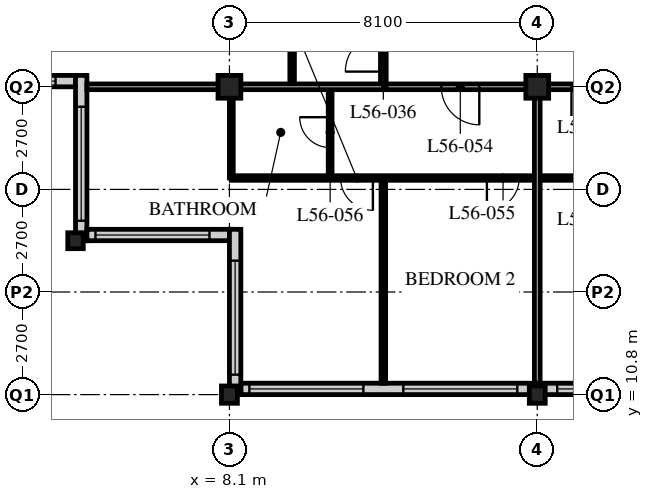
"""IFC4 building model, lengths in metres.
Left out: names, types, materials, properties, quantities, classifications, styles, units other than length and angle.
Written with IfcOpenShell. Run it as: python <this file> out.ifc"""

import sys

from ifc_helpers import new_model, si_unit, direction, frame, frame_2d, origin, origin_2d, place, context, subcontext, project, spatial, rectangle, hollow_rectangle, i_section, extrude, element, fill, save


model = new_model("IFC4")
c1 = context("Model", 3, precision=1e-05, world=origin(), true_north=direction((0.0, 1.0)))
c2 = subcontext(c1, "Body", "Model", "MODEL_VIEW")
j1 = project(units=[si_unit("LENGTHUNIT", "METRE"), si_unit("PLANEANGLEUNIT", "RADIAN")], contexts=[c1])
p1 = place(None, origin())
s1 = spatial("IfcSite", under=j1, at=p1, CompositionType="ELEMENT")
p2 = place(p1, origin())
s2 = spatial("IfcBuilding", under=s1, at=p2, CompositionType="ELEMENT")
p3 = place(p2, frame((0.0, 0.0, 217.2)))
s3 = spatial("IfcBuildingStorey", under=s2, at=p3, CompositionType="ELEMENT", Elevation=217.2)
p4 = place(p3, frame((4.05, 14.85, 0.0), z_axis=(0.0, 0.0, 1.0), x_axis=(1.0, 0.0, 0.0)))
e1 = element("IfcColumn", 1, at=p4, inside=s3, PredefinedType="COLUMN", context=c2, shape_type="SweptSolid", body=[
    extrude(i_section(OverallWidth=0.407, OverallDepth=0.419, WebThickness=0.031, FlangeThickness=0.049, FilletRadius=0.015, at=origin_2d()), origin(), (0.0, 0.0, 1.0), 3.6),
])
p5 = place(p3, frame((8.1, 10.8, 0.0), z_axis=(0.0, 0.0, 1.0), x_axis=(1.0, 0.0, 0.0)))
e2 = element("IfcColumn", 2, at=p5, inside=s3, PredefinedType="COLUMN", context=c2, shape_type="SweptSolid", body=[
    extrude(i_section(OverallWidth=0.418, OverallDepth=0.456, WebThickness=0.042, FlangeThickness=0.067, FilletRadius=0.015, at=origin_2d()), origin(), (0.0, 0.0, 1.0), 3.6),
])
p6 = place(p3, frame((8.1, 18.9, 0.0), z_axis=(0.0, 0.0, 1.0), x_axis=(1.0, 0.0, 0.0)))
e3 = element("IfcColumn", 3, at=p6, inside=s3, PredefinedType="COLUMN", context=c2, shape_type="SweptSolid", body=[
    extrude(hollow_rectangle(XDim=0.6, YDim=0.6, WallThickness=0.05, at=origin_2d()), origin(), (0.0, 0.0, 1.0), 3.6),
])
p7 = place(p3, frame((16.2, 10.8, 0.0), z_axis=(0.0, 0.0, 1.0), x_axis=(1.0, 0.0, 0.0)))
e4 = element("IfcColumn", 4, at=p7, inside=s3, PredefinedType="COLUMN", context=c2, shape_type="SweptSolid", body=[
    extrude(i_section(OverallWidth=0.418, OverallDepth=0.456, WebThickness=0.042, FlangeThickness=0.067, FilletRadius=0.015, at=origin_2d()), origin(), (0.0, 0.0, 1.0), 3.6),
])
p8 = place(p3, frame((16.2, 18.9, 0.0), z_axis=(0.0, 0.0, 1.0), x_axis=(1.0, 0.0, 0.0)))
e5 = element("IfcColumn", 5, at=p8, inside=s3, PredefinedType="COLUMN", context=c2, shape_type="SweptSolid", body=[
    extrude(hollow_rectangle(XDim=0.6, YDim=0.6, WallThickness=0.05, at=origin_2d()), origin(), (0.0, 0.0, 1.0), 3.6),
])
p9 = place(p3, frame((8.4, 10.95, 0.0), z_axis=(0.0, 0.0, 1.0), x_axis=(1.0, 0.0, 0.0)))
e6 = element("IfcWall", 6, at=p9, inside=s3, PredefinedType="SOLIDWALL", context=c2, shape_type="SweptSolid", body=[
    extrude(rectangle(XDim=40.2, YDim=0.3, at=frame_2d((20.1, 0.0))), origin(), (0.0, 0.0, 1.0), 3.39),
])
p10 = place(p9, frame((0.225, 0.0, 0.6)))
e7 = element("IfcOpeningElement", 7, at=p10, cuts=e6, PredefinedType="OPENING", context=c2, shape_type="SweptSolid", body=[
    extrude(rectangle(XDim=3.0, YDim=2.4, at=frame_2d((1.5, 1.2))), frame((0.0, 0.16, 0.0), z_axis=(0.0, -1.0, 0.0), x_axis=(1.0, 0.0, 0.0)), (0.0, 0.0, 1.0), 0.32),
])
p11 = place(p9, frame((4.275, 0.0, 0.6)))
e8 = element("IfcOpeningElement", 8, at=p11, cuts=e6, PredefinedType="OPENING", context=c2, shape_type="SweptSolid", body=[
    extrude(rectangle(XDim=3.0, YDim=2.4, at=frame_2d((1.5, 1.2))), frame((0.0, 0.16, 0.0), z_axis=(0.0, -1.0, 0.0), x_axis=(1.0, 0.0, 0.0)), (0.0, 0.0, 1.0), 0.32),
])
p12 = place(p9, frame((8.325, 0.0, 0.6)))
e9 = element("IfcOpeningElement", 9, at=p12, cuts=e6, PredefinedType="OPENING", context=c2, shape_type="SweptSolid", body=[
    extrude(rectangle(XDim=3.0, YDim=2.4, at=frame_2d((1.5, 1.2))), frame((0.0, 0.16, 0.0), z_axis=(0.0, -1.0, 0.0), x_axis=(1.0, 0.0, 0.0)), (0.0, 0.0, 1.0), 0.32),
])
p13 = place(p9, frame((12.375, 0.0, 0.6)))
e10 = element("IfcOpeningElement", 10, at=p13, cuts=e6, PredefinedType="OPENING", context=c2, shape_type="SweptSolid", body=[
    extrude(rectangle(XDim=3.0, YDim=2.4, at=frame_2d((1.5, 1.2))), frame((0.0, 0.16, 0.0), z_axis=(0.0, -1.0, 0.0), x_axis=(1.0, 0.0, 0.0)), (0.0, 0.0, 1.0), 0.32),
])
p14 = place(p9, frame((16.425, 0.0, 0.6)))
e11 = element("IfcOpeningElement", 11, at=p14, cuts=e6, PredefinedType="OPENING", context=c2, shape_type="SweptSolid", body=[
    extrude(rectangle(XDim=3.0, YDim=2.4, at=frame_2d((1.5, 1.2))), frame((0.0, 0.16, 0.0), z_axis=(0.0, -1.0, 0.0), x_axis=(1.0, 0.0, 0.0)), (0.0, 0.0, 1.0), 0.32),
])
p15 = place(p9, frame((20.475, 0.0, 0.6)))
e12 = element("IfcOpeningElement", 12, at=p15, cuts=e6, PredefinedType="OPENING", context=c2, shape_type="SweptSolid", body=[
    extrude(rectangle(XDim=3.0, YDim=2.4, at=frame_2d((1.5, 1.2))), frame((0.0, 0.16, 0.0), z_axis=(0.0, -1.0, 0.0), x_axis=(1.0, 0.0, 0.0)), (0.0, 0.0, 1.0), 0.32),
])
p16 = place(p9, frame((24.525, 0.0, 0.6)))
e13 = element("IfcOpeningElement", 13, at=p16, cuts=e6, PredefinedType="OPENING", context=c2, shape_type="SweptSolid", body=[
    extrude(rectangle(XDim=3.0, YDim=2.4, at=frame_2d((1.5, 1.2))), frame((0.0, 0.16, 0.0), z_axis=(0.0, -1.0, 0.0), x_axis=(1.0, 0.0, 0.0)), (0.0, 0.0, 1.0), 0.32),
])
p17 = place(p9, frame((28.575, 0.0, 0.6)))
e14 = element("IfcOpeningElement", 14, at=p17, cuts=e6, PredefinedType="OPENING", context=c2, shape_type="SweptSolid", body=[
    extrude(rectangle(XDim=3.0, YDim=2.4, at=frame_2d((1.5, 1.2))), frame((0.0, 0.16, 0.0), z_axis=(0.0, -1.0, 0.0), x_axis=(1.0, 0.0, 0.0)), (0.0, 0.0, 1.0), 0.32),
])
p18 = place(p9, frame((32.625, 0.0, 0.6)))
e15 = element("IfcOpeningElement", 15, at=p18, cuts=e6, PredefinedType="OPENING", context=c2, shape_type="SweptSolid", body=[
    extrude(rectangle(XDim=3.0, YDim=2.4, at=frame_2d((1.5, 1.2))), frame((0.0, 0.16, 0.0), z_axis=(0.0, -1.0, 0.0), x_axis=(1.0, 0.0, 0.0)), (0.0, 0.0, 1.0), 0.32),
])
p19 = place(p9, frame((36.675, 0.0, 0.6)))
e16 = element("IfcOpeningElement", 16, at=p19, cuts=e6, PredefinedType="OPENING", context=c2, shape_type="SweptSolid", body=[
    extrude(rectangle(XDim=3.0, YDim=2.4, at=frame_2d((1.5, 1.2))), frame((0.0, 0.16, 0.0), z_axis=(0.0, -1.0, 0.0), x_axis=(1.0, 0.0, 0.0)), (0.0, 0.0, 1.0), 0.32),
])
p20 = place(p3, frame((0.3, 19.05, 0.0), z_axis=(0.0, 0.0, 1.0), x_axis=(1.0, 0.0, 0.0)))
e17 = element("IfcWall", 17, at=p20, inside=s3, PredefinedType="SOLIDWALL", context=c2, shape_type="SweptSolid", body=[
    extrude(rectangle(XDim=3.75, YDim=0.3, at=frame_2d((1.875, 0.0))), origin(), (0.0, 0.0, 1.0), 3.39),
])
p21 = place(p20, frame((0.225, 0.0, 0.6)))
e18 = element("IfcOpeningElement", 18, at=p21, cuts=e17, PredefinedType="OPENING", context=c2, shape_type="SweptSolid", body=[
    extrude(rectangle(XDim=3.0, YDim=2.0, at=frame_2d((1.5, 1.0))), frame((0.0, 0.16, 0.0), z_axis=(0.0, -1.0, 0.0), x_axis=(1.0, 0.0, 0.0)), (0.0, 0.0, 1.0), 0.32),
])
p22 = place(p3, frame((4.2, 19.2, 0.0), z_axis=(0.0, 0.0, 1.0), x_axis=(0.0, -1.0, 0.0)))
e19 = element("IfcWall", 19, at=p22, inside=s3, PredefinedType="SOLIDWALL", context=c2, shape_type="SweptSolid", body=[
    extrude(rectangle(XDim=4.35, YDim=0.3, at=frame_2d((2.175, 0.0))), origin(), (0.0, 0.0, 1.0), 3.39),
])
p23 = place(p22, frame((0.825, 0.0, 0.6)))
e20 = element("IfcOpeningElement", 20, at=p23, cuts=e19, PredefinedType="OPENING", context=c2, shape_type="SweptSolid", body=[
    extrude(rectangle(XDim=3.0, YDim=2.0, at=frame_2d((1.5, 1.0))), frame((0.0, 0.16, 0.0), z_axis=(0.0, -1.0, 0.0), x_axis=(1.0, 0.0, 0.0)), (0.0, 0.0, 1.0), 0.32),
])
p24 = place(p3, frame((4.35, 15.0, 0.0), z_axis=(0.0, 0.0, 1.0), x_axis=(1.0, 0.0, 0.0)))
e21 = element("IfcWall", 21, at=p24, inside=s3, PredefinedType="SOLIDWALL", context=c2, shape_type="SweptSolid", body=[
    extrude(rectangle(XDim=3.75, YDim=0.3, at=frame_2d((1.875, 0.0))), origin(), (0.0, 0.0, 1.0), 3.39),
])
p25 = place(p24, frame((0.225, 0.0, 0.6)))
e22 = element("IfcOpeningElement", 22, at=p25, cuts=e21, PredefinedType="OPENING", context=c2, shape_type="SweptSolid", body=[
    extrude(rectangle(XDim=3.0, YDim=2.0, at=frame_2d((1.5, 1.0))), frame((0.0, 0.16, 0.0), z_axis=(0.0, -1.0, 0.0), x_axis=(1.0, 0.0, 0.0)), (0.0, 0.0, 1.0), 0.32),
])
p26 = place(p3, frame((8.25, 15.15, 0.0), z_axis=(0.0, 0.0, 1.0), x_axis=(0.0, -1.0, 0.0)))
e23 = element("IfcWall", 23, at=p26, inside=s3, PredefinedType="SOLIDWALL", context=c2, shape_type="SweptSolid", body=[
    extrude(rectangle(XDim=4.35, YDim=0.3, at=frame_2d((2.175, 0.0))), origin(), (0.0, 0.0, 1.0), 3.39),
])
p27 = place(p26, frame((0.825, 0.0, 0.6)))
e24 = element("IfcOpeningElement", 24, at=p27, cuts=e23, PredefinedType="OPENING", context=c2, shape_type="SweptSolid", body=[
    extrude(rectangle(XDim=3.0, YDim=2.0, at=frame_2d((1.5, 1.0))), frame((0.0, 0.16, 0.0), z_axis=(0.0, -1.0, 0.0), x_axis=(1.0, 0.0, 0.0)), (0.0, 0.0, 1.0), 0.32),
])
p28 = place(p3, frame((12.15, 18.9, 0.0), z_axis=(0.0, 0.0, 1.0), x_axis=(1.0, 0.0, 0.0)))
e25 = element("IfcWall", 25, at=p28, inside=s3, PredefinedType="PARTITIONING", context=c2, shape_type="SweptSolid", body=[
    extrude(rectangle(XDim=36.45, YDim=0.15, at=frame_2d((18.225, 0.0))), origin(), (0.0, 0.0, 1.0), 2.778),
])
p29 = place(p28, frame((4.95, 0.0, 0.0)))
e26 = element("IfcOpeningElement", 26, at=p29, cuts=e25, PredefinedType="OPENING", context=c2, shape_type="SweptSolid", body=[
    extrude(rectangle(XDim=1.0, YDim=2.1, at=frame_2d((0.5, 1.05))), frame((0.0, 0.085, 0.0), z_axis=(0.0, -1.0, 0.0), x_axis=(1.0, 0.0, 0.0)), (0.0, 0.0, 1.0), 0.17),
])
p30 = place(p28, frame((22.6, 0.0, 0.0)))
e27 = element("IfcOpeningElement", 27, at=p30, cuts=e25, PredefinedType="OPENING", context=c2, shape_type="SweptSolid", body=[
    extrude(rectangle(XDim=1.0, YDim=2.1, at=frame_2d((0.5, 1.05))), frame((0.0, 0.085, 0.0), z_axis=(0.0, -1.0, 0.0), x_axis=(1.0, 0.0, 0.0)), (0.0, 0.0, 1.0), 0.17),
])
p31 = place(p28, frame((25.0, 0.0, 0.0)))
e28 = element("IfcOpeningElement", 28, at=p31, cuts=e25, PredefinedType="OPENING", context=c2, shape_type="SweptSolid", body=[
    extrude(rectangle(XDim=1.0, YDim=2.1, at=frame_2d((0.5, 1.05))), frame((0.0, 0.085, 0.0), z_axis=(0.0, -1.0, 0.0), x_axis=(1.0, 0.0, 0.0)), (0.0, 0.0, 1.0), 0.17),
])
p32 = place(p28, frame((30.7, 0.0, 0.0)))
e29 = element("IfcOpeningElement", 29, at=p32, cuts=e25, PredefinedType="OPENING", context=c2, shape_type="SweptSolid", body=[
    extrude(rectangle(XDim=1.0, YDim=2.1, at=frame_2d((0.5, 1.05))), frame((0.0, 0.085, 0.0), z_axis=(0.0, -1.0, 0.0), x_axis=(1.0, 0.0, 0.0)), (0.0, 0.0, 1.0), 0.17),
])
p33 = place(p28, frame((1.525, 0.0, 0.0)))
e30 = element("IfcOpeningElement", 30, at=p33, cuts=e25, PredefinedType="OPENING", context=c2, shape_type="SweptSolid", body=[
    extrude(rectangle(XDim=1.0, YDim=2.1, at=frame_2d((0.5, 1.05))), frame((0.0, 0.085, 0.0), z_axis=(0.0, -1.0, 0.0), x_axis=(1.0, 0.0, 0.0)), (0.0, 0.0, 1.0), 0.17),
])
p34 = place(p28, frame((32.825, 0.0, 0.0)))
e31 = element("IfcOpeningElement", 31, at=p34, cuts=e25, PredefinedType="OPENING", context=c2, shape_type="SweptSolid", body=[
    extrude(rectangle(XDim=1.0, YDim=2.1, at=frame_2d((0.5, 1.05))), frame((0.0, 0.085, 0.0), z_axis=(0.0, -1.0, 0.0), x_axis=(1.0, 0.0, 0.0)), (0.0, 0.0, 1.0), 0.17),
])
p35 = place(p3, frame((12.15, 18.9, 0.0), z_axis=(0.0, 0.0, 1.0), x_axis=(0.0, 1.0, 0.0)))
e32 = element("IfcWall", 32, at=p35, inside=s3, PredefinedType="PARTITIONING", context=c2, shape_type="SweptSolid", body=[
    extrude(rectangle(XDim=24.3, YDim=0.15, at=frame_2d((12.15, 0.0))), origin(), (0.0, 0.0, 1.0), 3.39),
])
p36 = place(p35, frame((0.4, 0.0, 0.0)))
e33 = element("IfcOpeningElement", 33, at=p36, cuts=e32, PredefinedType="OPENING", context=c2, shape_type="SweptSolid", body=[
    extrude(rectangle(XDim=1.0, YDim=2.1, at=frame_2d((0.5, 1.05))), frame((0.0, 0.085, 0.0), z_axis=(0.0, -1.0, 0.0), x_axis=(1.0, 0.0, 0.0)), (0.0, 0.0, 1.0), 0.17),
])
p37 = place(p35, frame((16.6, 0.0, 0.0)))
e34 = element("IfcOpeningElement", 34, at=p37, cuts=e32, PredefinedType="OPENING", context=c2, shape_type="SweptSolid", body=[
    extrude(rectangle(XDim=1.0, YDim=2.1, at=frame_2d((0.5, 1.05))), frame((0.0, 0.085, 0.0), z_axis=(0.0, -1.0, 0.0), x_axis=(1.0, 0.0, 0.0)), (0.0, 0.0, 1.0), 0.17),
])
p38 = place(p3, frame((9.75, 18.9, 0.0), z_axis=(0.0, 0.0, 1.0), x_axis=(0.0, 1.0, 0.0)))
e35 = element("IfcWall", 35, at=p38, inside=s3, PredefinedType="PARTITIONING", context=c2, shape_type="SweptSolid", body=[
    extrude(rectangle(XDim=24.3, YDim=0.12, at=frame_2d((12.15, 0.0))), origin(), (0.0, 0.0, 1.0), 3.39),
])
p39 = place(p38, frame((0.975, 0.0, 0.0)))
e36 = element("IfcOpeningElement", 36, at=p39, cuts=e35, PredefinedType="OPENING", context=c2, shape_type="SweptSolid", body=[
    extrude(rectangle(XDim=0.85, YDim=2.1, at=frame_2d((0.425, 1.05))), frame((0.0, 0.07, 0.0), z_axis=(0.0, -1.0, 0.0), x_axis=(1.0, 0.0, 0.0)), (0.0, 0.0, 1.0), 0.14),
])
p40 = place(p38, frame((8.425, 0.0, 0.0)))
e37 = element("IfcOpeningElement", 37, at=p40, cuts=e35, PredefinedType="OPENING", context=c2, shape_type="SweptSolid", body=[
    extrude(rectangle(XDim=0.85, YDim=2.1, at=frame_2d((0.425, 1.05))), frame((0.0, 0.07, 0.0), z_axis=(0.0, -1.0, 0.0), x_axis=(1.0, 0.0, 0.0)), (0.0, 0.0, 1.0), 0.14),
])
p41 = place(p38, frame((12.475, 0.0, 0.0)))
e38 = element("IfcOpeningElement", 38, at=p41, cuts=e35, PredefinedType="OPENING", context=c2, shape_type="SweptSolid", body=[
    extrude(rectangle(XDim=0.85, YDim=2.1, at=frame_2d((0.425, 1.05))), frame((0.0, 0.07, 0.0), z_axis=(0.0, -1.0, 0.0), x_axis=(1.0, 0.0, 0.0)), (0.0, 0.0, 1.0), 0.14),
])
p42 = place(p38, frame((17.175, 0.0, 0.0)))
e39 = element("IfcOpeningElement", 39, at=p42, cuts=e35, PredefinedType="OPENING", context=c2, shape_type="SweptSolid", body=[
    extrude(rectangle(XDim=0.85, YDim=2.1, at=frame_2d((0.425, 1.05))), frame((0.0, 0.07, 0.0), z_axis=(0.0, -1.0, 0.0), x_axis=(1.0, 0.0, 0.0)), (0.0, 0.0, 1.0), 0.14),
])
p43 = place(p38, frame((20.575, 0.0, 0.0)))
e40 = element("IfcOpeningElement", 40, at=p43, cuts=e35, PredefinedType="OPENING", context=c2, shape_type="SweptSolid", body=[
    extrude(rectangle(XDim=0.85, YDim=2.1, at=frame_2d((0.425, 1.05))), frame((0.0, 0.07, 0.0), z_axis=(0.0, -1.0, 0.0), x_axis=(1.0, 0.0, 0.0)), (0.0, 0.0, 1.0), 0.14),
])
p44 = place(p3, frame((10.75, 18.9, 0.0), z_axis=(0.0, 0.0, 1.0), x_axis=(0.0, -1.0, 0.0)))
e41 = element("IfcWall", 41, at=p44, inside=s3, PredefinedType="PARTITIONING", context=c2, shape_type="SweptSolid", body=[
    extrude(rectangle(XDim=2.4, YDim=0.1, at=frame_2d((1.2, 0.0))), origin(), (0.0, 0.0, 1.0), 3.39),
])
p45 = place(p44, frame((0.8, 0.0, 0.0)))
e42 = element("IfcOpeningElement", 42, at=p45, cuts=e41, PredefinedType="OPENING", context=c2, shape_type="SweptSolid", body=[
    extrude(rectangle(XDim=0.8, YDim=2.1, at=frame_2d((0.4, 1.05))), frame((0.0, 0.06, 0.0), z_axis=(0.0, -1.0, 0.0), x_axis=(1.0, 0.0, 0.0)), (0.0, 0.0, 1.0), 0.12),
])
p46 = place(p3, frame((8.15, 18.9, 0.0), z_axis=(0.0, 0.0, 1.0), x_axis=(0.0, -1.0, 0.0)))
e43 = element("IfcWall", 43, at=p46, inside=s3, PredefinedType="PARTITIONING", context=c2, shape_type="SweptSolid", body=[
    extrude(rectangle(XDim=2.4, YDim=0.1, at=frame_2d((1.2, 0.0))), origin(), (0.0, 0.0, 1.0), 2.778),
])
p47 = place(p3, frame((8.15, 16.5, 0.0), z_axis=(0.0, 0.0, 1.0), x_axis=(1.0, 0.0, 0.0)))
e44 = element("IfcWall", 44, at=p47, inside=s3, PredefinedType="PARTITIONING", context=c2, shape_type="SweptSolid", body=[
    extrude(rectangle(XDim=24.25, YDim=0.12, at=frame_2d((12.125, 0.0))), origin(), (0.0, 0.0, 1.0), 3.39),
])
p48 = place(p47, frame((9.025, 0.0, 0.0)))
e45 = element("IfcOpeningElement", 45, at=p48, cuts=e44, PredefinedType="OPENING", context=c2, shape_type="SweptSolid", body=[
    extrude(rectangle(XDim=0.85, YDim=2.1, at=frame_2d((0.425, 1.05))), frame((0.0, 0.07, 0.0), z_axis=(0.0, -1.0, 0.0), x_axis=(1.0, 0.0, 0.0)), (0.0, 0.0, 1.0), 0.14),
])
p49 = place(p47, frame((16.475, 0.0, 0.0)))
e46 = element("IfcOpeningElement", 46, at=p49, cuts=e44, PredefinedType="OPENING", context=c2, shape_type="SweptSolid", body=[
    extrude(rectangle(XDim=0.85, YDim=2.1, at=frame_2d((0.425, 1.05))), frame((0.0, 0.07, 0.0), z_axis=(0.0, -1.0, 0.0), x_axis=(1.0, 0.0, 0.0)), (0.0, 0.0, 1.0), 0.14),
])
p50 = place(p47, frame((20.525, 0.0, 0.0)))
e47 = element("IfcOpeningElement", 47, at=p50, cuts=e44, PredefinedType="OPENING", context=c2, shape_type="SweptSolid", body=[
    extrude(rectangle(XDim=0.85, YDim=2.1, at=frame_2d((0.425, 1.05))), frame((0.0, 0.07, 0.0), z_axis=(0.0, -1.0, 0.0), x_axis=(1.0, 0.0, 0.0)), (0.0, 0.0, 1.0), 0.14),
])
p51 = place(p47, frame((6.725, 0.0, 0.0)))
e48 = element("IfcOpeningElement", 48, at=p51, cuts=e44, PredefinedType="OPENING", context=c2, shape_type="SweptSolid", body=[
    extrude(rectangle(XDim=0.85, YDim=2.1, at=frame_2d((0.425, 1.05))), frame((0.0, 0.07, 0.0), z_axis=(0.0, -1.0, 0.0), x_axis=(1.0, 0.0, 0.0)), (0.0, 0.0, 1.0), 0.14),
])
p52 = place(p47, frame((2.875, 0.0, 0.0)))
e49 = element("IfcOpeningElement", 49, at=p52, cuts=e44, PredefinedType="OPENING", context=c2, shape_type="SweptSolid", body=[
    extrude(rectangle(XDim=0.85, YDim=2.1, at=frame_2d((0.425, 1.05))), frame((0.0, 0.07, 0.0), z_axis=(0.0, -1.0, 0.0), x_axis=(1.0, 0.0, 0.0)), (0.0, 0.0, 1.0), 0.14),
])
p53 = place(p3, frame((12.15, 16.5, 0.0), z_axis=(0.0, 0.0, 1.0), x_axis=(0.0, -1.0, 0.0)))
e50 = element("IfcWall", 50, at=p53, inside=s3, PredefinedType="PARTITIONING", context=c2, shape_type="SweptSolid", body=[
    extrude(rectangle(XDim=5.4, YDim=0.12, at=frame_2d((2.7, 0.0))), origin(), (0.0, 0.0, 1.0), 3.39),
])
for number, where, z_axis, x_axis in (
    (51, (4.35, 18.9, 0.0), (0.0, 0.0, 1.0), (1.0, 0.0, 0.0)),
    (52, (16.2, 18.9, 0.0), (0.0, 0.0, 1.0), (0.0, -1.0, 0.0)),
):
    element("IfcWall", number, at=place(p3, frame(where, z_axis=z_axis, x_axis=x_axis)), inside=s3, PredefinedType="PARTITIONING", context=c2, shape_type="SweptSolid", body=[
        extrude(rectangle(XDim=7.8, YDim=0.15, at=frame_2d((3.9, 0.0))), origin(), (0.0, 0.0, 1.0), 2.778),
    ])
p54 = place(p10, origin())
e53 = element("IfcWindow", 53, at=p54, inside=s3, PartitioningType="SINGLE_PANEL", PredefinedType="WINDOW", context=c2, shape_type="SweptSolid", body=[
    extrude(rectangle(XDim=3.0, YDim=2.4, at=frame_2d((1.5, 1.2))), frame((0.0, 0.03, 0.0), z_axis=(0.0, -1.0, 0.0), x_axis=(1.0, 0.0, 0.0)), (0.0, 0.0, 1.0), 0.06),
])
fill(e7, e53)
p55 = place(p11, origin())
e54 = element("IfcWindow", 54, at=p55, inside=s3, PartitioningType="SINGLE_PANEL", PredefinedType="WINDOW", context=c2, shape_type="SweptSolid", body=[
    extrude(rectangle(XDim=3.0, YDim=2.4, at=frame_2d((1.5, 1.2))), frame((0.0, 0.03, 0.0), z_axis=(0.0, -1.0, 0.0), x_axis=(1.0, 0.0, 0.0)), (0.0, 0.0, 1.0), 0.06),
])
fill(e8, e54)
p56 = place(p12, origin())
e55 = element("IfcWindow", 55, at=p56, inside=s3, PartitioningType="SINGLE_PANEL", PredefinedType="WINDOW", context=c2, shape_type="SweptSolid", body=[
    extrude(rectangle(XDim=3.0, YDim=2.4, at=frame_2d((1.5, 1.2))), frame((0.0, 0.03, 0.0), z_axis=(0.0, -1.0, 0.0), x_axis=(1.0, 0.0, 0.0)), (0.0, 0.0, 1.0), 0.06),
])
fill(e9, e55)
p57 = place(p21, origin())
e56 = element("IfcWindow", 56, at=p57, inside=s3, PartitioningType="SINGLE_PANEL", PredefinedType="WINDOW", context=c2, shape_type="SweptSolid", body=[
    extrude(rectangle(XDim=3.0, YDim=2.0, at=frame_2d((1.5, 1.0))), frame((0.0, 0.03, 0.0), z_axis=(0.0, -1.0, 0.0), x_axis=(1.0, 0.0, 0.0)), (0.0, 0.0, 1.0), 0.06),
])
fill(e18, e56)
p58 = place(p23, origin())
e57 = element("IfcWindow", 57, at=p58, inside=s3, PartitioningType="SINGLE_PANEL", PredefinedType="WINDOW", context=c2, shape_type="SweptSolid", body=[
    extrude(rectangle(XDim=3.0, YDim=2.0, at=frame_2d((1.5, 1.0))), frame((0.0, 0.03, 0.0), z_axis=(0.0, -1.0, 0.0), x_axis=(1.0, 0.0, 0.0)), (0.0, 0.0, 1.0), 0.06),
])
fill(e20, e57)
p59 = place(p25, origin())
e58 = element("IfcWindow", 58, at=p59, inside=s3, PartitioningType="SINGLE_PANEL", PredefinedType="WINDOW", context=c2, shape_type="SweptSolid", body=[
    extrude(rectangle(XDim=3.0, YDim=2.0, at=frame_2d((1.5, 1.0))), frame((0.0, 0.03, 0.0), z_axis=(0.0, -1.0, 0.0), x_axis=(1.0, 0.0, 0.0)), (0.0, 0.0, 1.0), 0.06),
])
fill(e22, e58)
p60 = place(p27, origin())
e59 = element("IfcWindow", 59, at=p60, inside=s3, PartitioningType="SINGLE_PANEL", PredefinedType="WINDOW", context=c2, shape_type="SweptSolid", body=[
    extrude(rectangle(XDim=3.0, YDim=2.0, at=frame_2d((1.5, 1.0))), frame((0.0, 0.03, 0.0), z_axis=(0.0, -1.0, 0.0), x_axis=(1.0, 0.0, 0.0)), (0.0, 0.0, 1.0), 0.06),
])
fill(e24, e59)
p61 = place(p29, origin())
e60 = element("IfcDoor", 60, at=p61, inside=s3, OperationType="SINGLE_SWING_RIGHT", PredefinedType="DOOR", context=c2, shape_type="SweptSolid", body=[
    extrude(rectangle(XDim=1.0, YDim=2.1, at=frame_2d((0.5, 1.05))), frame((0.0, 0.025, 0.0), z_axis=(0.0, -1.0, 0.0), x_axis=(1.0, 0.0, 0.0)), (0.0, 0.0, 1.0), 0.05),
])
fill(e26, e60)
p62 = place(p36, origin())
e61 = element("IfcDoor", 61, at=p62, inside=s3, OperationType="SINGLE_SWING_LEFT", PredefinedType="DOOR", context=c2, shape_type="SweptSolid", body=[
    extrude(rectangle(XDim=1.0, YDim=2.1, at=frame_2d((0.5, 1.05))), frame((0.0, 0.025, 0.0), z_axis=(0.0, -1.0, 0.0), x_axis=(1.0, 0.0, 0.0)), (0.0, 0.0, 1.0), 0.05),
])
fill(e33, e61)
p63 = place(p33, origin())
e62 = element("IfcDoor", 62, at=p63, inside=s3, OperationType="SINGLE_SWING_LEFT", PredefinedType="DOOR", context=c2, shape_type="SweptSolid", body=[
    extrude(rectangle(XDim=1.0, YDim=2.1, at=frame_2d((0.5, 1.05))), frame((0.0, 0.025, 0.0), z_axis=(0.0, -1.0, 0.0), x_axis=(1.0, 0.0, 0.0)), (0.0, 0.0, 1.0), 0.05),
])
fill(e30, e62)
p64 = place(p51, origin())
e63 = element("IfcDoor", 63, at=p64, inside=s3, OperationType="SINGLE_SWING_RIGHT", PredefinedType="DOOR", context=c2, shape_type="SweptSolid", body=[
    extrude(rectangle(XDim=0.85, YDim=2.1, at=frame_2d((0.425, 1.05))), frame((0.0, 0.025, 0.0), z_axis=(0.0, -1.0, 0.0), x_axis=(1.0, 0.0, 0.0)), (0.0, 0.0, 1.0), 0.05),
])
fill(e48, e63)
p65 = place(p45, origin())
e64 = element("IfcDoor", 64, at=p65, inside=s3, OperationType="SINGLE_SWING_RIGHT", PredefinedType="DOOR", context=c2, shape_type="SweptSolid", body=[
    extrude(rectangle(XDim=0.8, YDim=2.1, at=frame_2d((0.4, 1.05))), frame((0.0, 0.025, 0.0), z_axis=(0.0, -1.0, 0.0), x_axis=(1.0, 0.0, 0.0)), (0.0, 0.0, 1.0), 0.05),
])
fill(e42, e64)
p66 = place(p52, origin())
e65 = element("IfcDoor", 65, at=p66, inside=s3, OperationType="SINGLE_SWING_LEFT", PredefinedType="DOOR", context=c2, shape_type="SweptSolid", body=[
    extrude(rectangle(XDim=0.85, YDim=2.1, at=frame_2d((0.425, 1.05))), frame((0.0, 0.025, 0.0), z_axis=(0.0, -1.0, 0.0), x_axis=(1.0, 0.0, 0.0)), (0.0, 0.0, 1.0), 0.05),
])
fill(e49, e65)
save(model, sys.argv[1])
